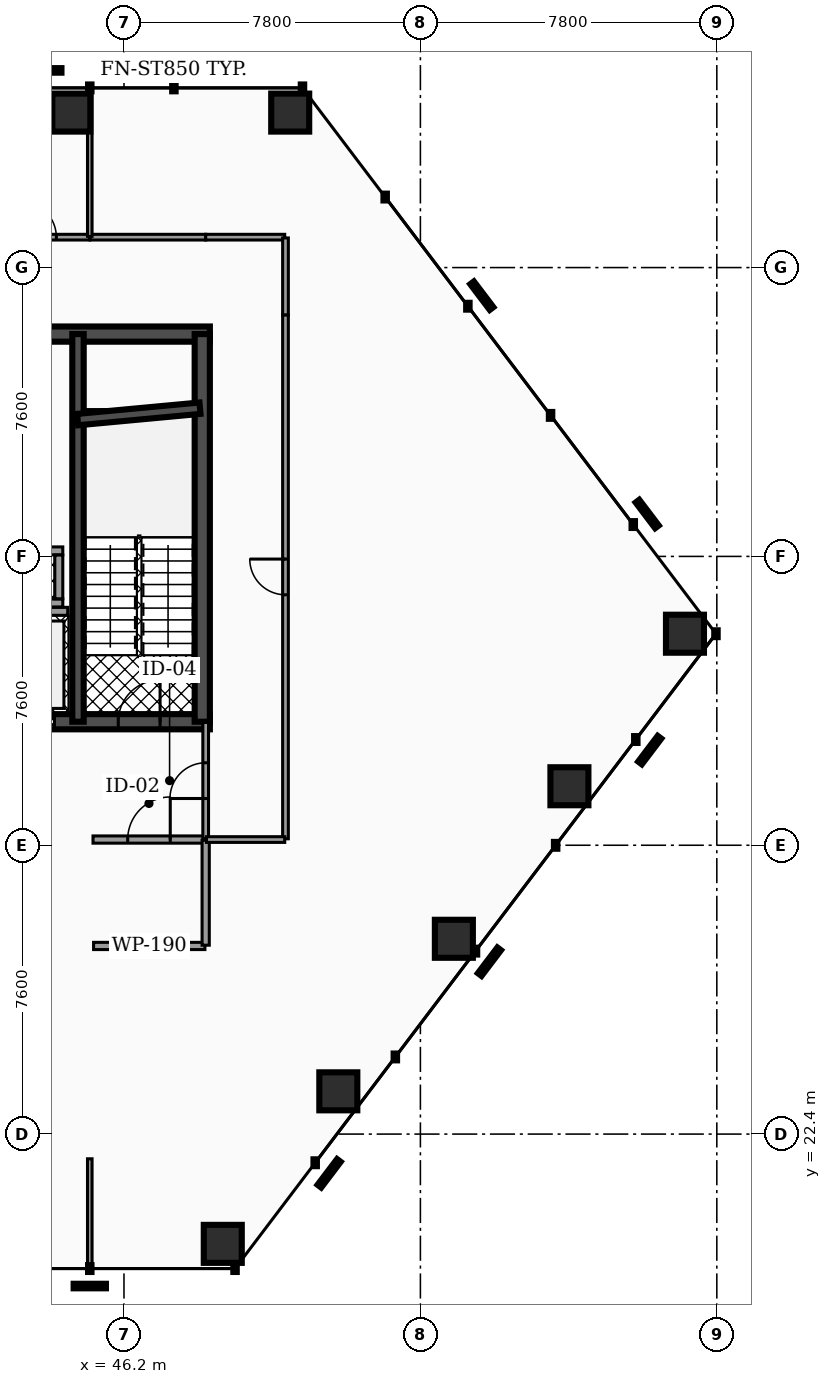
"""IFC4 building model, lengths in metres.
Left out: names, types, materials, properties, quantities, classifications, styles, units other than length and angle.
Written with IfcOpenShell. Run it as: python <this file> out.ifc"""

import sys

from ifc_helpers import new_model, si_unit, direction, frame, frame_2d, origin, origin_2d, place, context, subcontext, project, spatial, rectangle, hollow_rectangle, extrude, element, fill, save


model = new_model("IFC4")
c1 = context("Model", 3, precision=1e-05, world=origin(), true_north=direction((0.0, 1.0)))
c2 = subcontext(c1, "Body", "Model", "MODEL_VIEW")
j1 = project(units=[si_unit("LENGTHUNIT", "METRE"), si_unit("PLANEANGLEUNIT", "RADIAN")], contexts=[c1])
p1 = place(None, origin())
s1 = spatial("IfcSite", under=j1, at=p1, CompositionType="ELEMENT")
p2 = place(p1, origin())
s2 = spatial("IfcBuilding", under=s1, at=p2, CompositionType="ELEMENT")
p3 = place(p2, frame((0.0, 0.0, 56.1)))
s3 = spatial("IfcBuildingStorey", under=s2, at=p3, CompositionType="ELEMENT", Elevation=56.1)
p4 = place(p3, frame((28.4, 43.45, 0.0), z_axis=(0.0, 0.0, 1.0), x_axis=(1.0, 0.0, 0.0)))
e1 = element("IfcWall", 1, at=p4, inside=s3, PredefinedType="SHEAR", context=c2, shape_type="SweptSolid", body=[
    extrude(rectangle(XDim=20.06, YDim=0.4, at=frame_2d((10.03, 0.0))), origin(), (0.0, 0.0, 1.0), 3.82),
])
p5 = place(p3, frame((28.4, 33.25, 0.0), z_axis=(0.0, 0.0, 1.0), x_axis=(1.0, 0.0, 0.0)))
e2 = element("IfcWall", 2, at=p5, inside=s3, PredefinedType="SHEAR", context=c2, shape_type="SweptSolid", body=[
    extrude(rectangle(XDim=20.06, YDim=0.4, at=frame_2d((10.03, 0.0))), origin(), (0.0, 0.0, 1.0), 3.82),
])
p6 = place(p5, frame((4.03, 0.0, 0.0)))
e3 = element("IfcOpeningElement", 3, at=p6, cuts=e2, PredefinedType="OPENING", context=c2, shape_type="SweptSolid", body=[
    extrude(rectangle(XDim=1.1, YDim=2.15, at=frame_2d((0.55, 1.075))), frame((0.0, 0.21, 0.0), z_axis=(0.0, -1.0, 0.0), x_axis=(1.0, 0.0, 0.0)), (0.0, 0.0, 1.0), 0.42),
])
p7 = place(p5, frame((14.87, 0.0, 0.0)))
e4 = element("IfcOpeningElement", 4, at=p7, cuts=e2, PredefinedType="OPENING", context=c2, shape_type="SweptSolid", body=[
    extrude(rectangle(XDim=1.1, YDim=2.15, at=frame_2d((0.55, 1.075))), frame((0.0, 0.21, 0.0), z_axis=(0.0, -1.0, 0.0), x_axis=(1.0, 0.0, 0.0)), (0.0, 0.0, 1.0), 0.42),
])
p8 = place(p5, frame((1.31, 0.0, 0.0)))
e5 = element("IfcOpeningElement", 5, at=p8, cuts=e2, PredefinedType="OPENING", context=c2, shape_type="SweptSolid", body=[
    extrude(rectangle(XDim=1.1, YDim=2.2, at=frame_2d((0.55, 1.1))), frame((0.0, 0.21, 0.0), z_axis=(0.0, -1.0, 0.0), x_axis=(1.0, 0.0, 0.0)), (0.0, 0.0, 1.0), 0.42),
])
p9 = place(p5, frame((9.44, 0.0, 0.0)))
e6 = element("IfcOpeningElement", 6, at=p9, cuts=e2, PredefinedType="OPENING", context=c2, shape_type="SweptSolid", body=[
    extrude(rectangle(XDim=1.12, YDim=2.05, at=frame_2d((0.56, 1.025))), frame((0.0, 0.21, 0.0), z_axis=(0.0, -1.0, 0.0), x_axis=(1.0, 0.0, 0.0)), (0.0, 0.0, 1.0), 0.42),
])
p10 = place(p5, frame((17.65, 0.0, 0.0)))
e7 = element("IfcOpeningElement", 7, at=p10, cuts=e2, PredefinedType="OPENING", context=c2, shape_type="SweptSolid", body=[
    extrude(rectangle(XDim=1.1, YDim=2.2, at=frame_2d((0.55, 1.1))), frame((0.0, 0.21, 0.0), z_axis=(0.0, -1.0, 0.0), x_axis=(1.0, 0.0, 0.0)), (0.0, 0.0, 1.0), 0.42),
])
p11 = place(p3, frame((44.99, 33.25, 0.0), z_axis=(0.0, 0.0, 1.0), x_axis=(0.0, 1.0, 0.0)))
e8 = element("IfcWall", 8, at=p11, inside=s3, PredefinedType="SHEAR", context=c2, shape_type="SweptSolid", body=[
    extrude(rectangle(XDim=10.2, YDim=0.3, at=frame_2d((5.1, 0.0))), origin(), (0.0, 0.0, 1.0), 3.82),
])
p12 = place(p3, frame((48.26, 33.25, 0.0), z_axis=(0.0, 0.0, 1.0), x_axis=(0.0, 1.0, 0.0)))
e9 = element("IfcWall", 9, at=p12, inside=s3, PredefinedType="SHEAR", context=c2, shape_type="SweptSolid", body=[
    extrude(rectangle(XDim=10.2, YDim=0.4, at=frame_2d((5.1, 0.0))), origin(), (0.0, 0.0, 1.0), 3.82),
])
p13 = place(p3, frame((44.98, 41.2, 0.0), z_axis=(0.0, 0.0, 1.0), x_axis=(0.995686468965, 0.09278176286, 0.0)))
e10 = element("IfcWall", 10, at=p13, inside=s3, PredefinedType="SHEAR", context=c2, shape_type="SweptSolid", body=[
    extrude(rectangle(XDim=3.234, YDim=0.3, at=frame_2d((1.617, 0.0))), origin(), (0.0, 0.0, 1.0), 3.82),
])
for number, where, z_axis, x_axis in (
    (11, (50.574, 49.278, 0.0), (0.0, 0.0, 1.0), (1.0, 0.0, 0.0)),
    (12, (44.814, 49.278, 0.0), (0.0, 0.0, 1.0), (1.0, 0.0, 0.0)),
    (13, (48.8, 19.512, 0.0), (0.0, 0.0, 1.0), (1.0, 0.0, 0.0)),
    (14, (51.84, 23.525, 0.0), (0.0, 0.0, 1.0), (1.0, 0.0, 0.0)),
    (15, (54.881, 27.539, 0.0), (0.0, 0.0, 1.0), (1.0, 0.0, 0.0)),
    (16, (57.921, 31.552, 0.0), (0.0, 0.0, 1.0), (1.0, 0.0, 0.0)),
    (17, (60.962, 35.566, 0.0), (0.0, 0.0, 1.0), (1.0, 0.0, 0.0)),
):
    element("IfcColumn", number, at=place(p3, frame(where, z_axis=z_axis, x_axis=x_axis)), inside=s3, PredefinedType="COLUMN", context=c2, shape_type="SweptSolid", body=[
        extrude(hollow_rectangle(XDim=1.0, YDim=1.0, WallThickness=0.05, at=origin_2d()), origin(), (0.0, 0.0, 1.0), 3.82),
    ])
p14 = place(p3, frame((42.92, 36.155, 0.0), z_axis=(0.0, 0.0, 1.0), x_axis=(1.0, 0.0, 0.0)))
e18 = element("IfcWall", 18, at=p14, inside=s3, PredefinedType="SOLIDWALL", context=c2, shape_type="SweptSolid", body=[
    extrude(rectangle(XDim=1.8, YDim=0.21, at=frame_2d((0.9, 0.0))), origin(), (0.0, 0.0, 1.0), 2.792),
])
for number, where, z_axis, x_axis in (
    (19, (42.99, 36.375, 0.0), (0.0, 0.0, 1.0), (1.0, 0.0, 0.0)),
    (20, (42.99, 37.745, 0.0), (0.0, 0.0, 1.0), (1.0, 0.0, 0.0)),
):
    element("IfcWall", number, at=place(p3, frame(where, z_axis=z_axis, x_axis=x_axis)), inside=s3, PredefinedType="SOLIDWALL", context=c2, shape_type="SweptSolid", body=[
        extrude(rectangle(XDim=1.6, YDim=0.21, at=frame_2d((0.8, 0.0))), origin(), (0.0, 0.0, 1.0), 3.82),
    ])
p15 = place(p3, frame((44.485, 36.485, 0.0), z_axis=(0.0, 0.0, 1.0), x_axis=(0.0, 1.0, 0.0)))
e21 = element("IfcWall", 21, at=p15, inside=s3, PredefinedType="SOLIDWALL", context=c2, shape_type="SweptSolid", body=[
    extrude(rectangle(XDim=1.15, YDim=0.21, at=frame_2d((0.575, 0.0))), origin(), (0.0, 0.0, 1.0), 3.82),
])
p16 = place(p3, frame((45.385, 30.15, 0.0), z_axis=(0.0, 0.0, 1.0), x_axis=(1.0, 0.0, 0.0)))
e22 = element("IfcWall", 22, at=p16, inside=s3, PredefinedType="PARTITIONING", context=c2, shape_type="SweptSolid", body=[
    extrude(rectangle(XDim=2.945, YDim=0.19, at=frame_2d((1.473, 0.0))), origin(), (0.0, 0.0, 1.0), 2.777),
])
p17 = place(p16, frame((0.913, 0.0, 0.0)))
e23 = element("IfcOpeningElement", 23, at=p17, cuts=e22, PredefinedType="OPENING", context=c2, shape_type="SweptSolid", body=[
    extrude(rectangle(XDim=1.12, YDim=2.05, at=frame_2d((0.56, 1.025))), frame((0.0, 0.105, 0.0), z_axis=(0.0, -1.0, 0.0), x_axis=(1.0, 0.0, 0.0)), (0.0, 0.0, 1.0), 0.21),
])
p18 = place(p3, frame((48.35, 30.17, 0.0), z_axis=(0.0, 0.0, 1.0), x_axis=(0.0, 1.0, 0.0)))
e24 = element("IfcWall", 24, at=p18, inside=s3, PredefinedType="PARTITIONING", context=c2, shape_type="SweptSolid", body=[
    extrude(rectangle(XDim=3.06, YDim=0.15, at=frame_2d((1.53, 0.0))), origin(), (0.0, 0.0, 1.0), 2.777),
])
p19 = place(p18, frame((1.06, 0.0, 0.0)))
e25 = element("IfcOpeningElement", 25, at=p19, cuts=e24, PredefinedType="OPENING", context=c2, shape_type="SweptSolid", body=[
    extrude(rectangle(XDim=0.94, YDim=2.05, at=frame_2d((0.47, 1.025))), frame((0.0, 0.085, 0.0), z_axis=(0.0, -1.0, 0.0), x_axis=(1.0, 0.0, 0.0)), (0.0, 0.0, 1.0), 0.17),
])
p20 = place(p3, frame((45.4, 27.35, 0.0), z_axis=(0.0, 0.0, 1.0), x_axis=(1.0, 0.0, 0.0)))
e26 = element("IfcWall", 26, at=p20, inside=s3, PredefinedType="PARTITIONING", context=c2, shape_type="SweptSolid", body=[
    extrude(rectangle(XDim=2.93, YDim=0.19, at=frame_2d((1.465, 0.0))), origin(), (0.0, 0.0, 1.0), 2.777),
])
p21 = place(p3, frame((48.35, 27.37, 0.0), z_axis=(0.0, 0.0, 1.0), x_axis=(0.0, 1.0, 0.0)))
e27 = element("IfcWall", 27, at=p21, inside=s3, PredefinedType="PARTITIONING", context=c2, shape_type="SweptSolid", body=[
    extrude(rectangle(XDim=2.76, YDim=0.19, at=frame_2d((1.38, 0.0))), origin(), (0.0, 0.0, 1.0), 2.777),
])
p22 = place(p3, frame((45.305, 46.0, 0.0), z_axis=(0.0, 0.0, 1.0), x_axis=(1.0, 0.0, 0.0)))
e28 = element("IfcWall", 28, at=p22, inside=s3, PredefinedType="PARTITIONING", context=c2, shape_type="SweptSolid", body=[
    extrude(rectangle(XDim=3.045, YDim=0.15, at=frame_2d((1.522, 0.0))), origin(), (0.0, 0.0, 1.0), 2.777),
])
p23 = place(p3, frame((48.35, 46.0, 0.0), z_axis=(0.0, 0.0, 1.0), x_axis=(1.0, 0.0, 0.0)))
e29 = element("IfcWall", 29, at=p23, inside=s3, PredefinedType="PARTITIONING", context=c2, shape_type="SweptSolid", body=[
    extrude(rectangle(XDim=2.08, YDim=0.15, at=frame_2d((1.04, 0.0))), origin(), (0.0, 0.0, 1.0), 2.777),
])
p24 = place(p3, frame((50.45, 43.95, 0.0), z_axis=(0.0, 0.0, 1.0), x_axis=(0.0, 1.0, 0.0)))
e30 = element("IfcWall", 30, at=p24, inside=s3, PredefinedType="PARTITIONING", context=c2, shape_type="SweptSolid", body=[
    extrude(rectangle(XDim=2.03, YDim=0.15, at=frame_2d((1.015, 0.0))), origin(), (0.0, 0.0, 1.0), 2.777),
])
p25 = place(p3, frame((50.45, 30.17, 0.0), z_axis=(0.0, 0.0, 1.0), x_axis=(0.0, 1.0, 0.0)))
e31 = element("IfcWall", 31, at=p25, inside=s3, PredefinedType="PARTITIONING", context=c2, shape_type="SweptSolid", body=[
    extrude(rectangle(XDim=13.78, YDim=0.15, at=frame_2d((6.89, 0.0))), origin(), (0.0, 0.0, 1.0), 2.777),
])
p26 = place(p25, frame((6.42, 0.0, 0.0)))
e32 = element("IfcOpeningElement", 32, at=p26, cuts=e31, PredefinedType="OPENING", context=c2, shape_type="SweptSolid", body=[
    extrude(rectangle(XDim=0.94, YDim=2.05, at=frame_2d((0.47, 1.025))), frame((0.0, 0.085, 0.0), z_axis=(0.0, -1.0, 0.0), x_axis=(1.0, 0.0, 0.0)), (0.0, 0.0, 1.0), 0.17),
])
p27 = place(p3, frame((48.37, 30.15, 0.0), z_axis=(0.0, 0.0, 1.0), x_axis=(1.0, 0.0, 0.0)))
e33 = element("IfcWall", 33, at=p27, inside=s3, PredefinedType="PARTITIONING", context=c2, shape_type="SweptSolid", body=[
    extrude(rectangle(XDim=2.06, YDim=0.15, at=frame_2d((1.03, 0.0))), origin(), (0.0, 0.0, 1.0), 2.777),
])
p28 = place(p3, frame((42.605, 46.0, 0.0), z_axis=(0.0, 0.0, 1.0), x_axis=(1.0, 0.0, 0.0)))
e34 = element("IfcWall", 34, at=p28, inside=s3, PredefinedType="PARTITIONING", context=c2, shape_type="SweptSolid", body=[
    extrude(rectangle(XDim=2.69, YDim=0.15, at=frame_2d((1.345, 0.0))), origin(), (0.0, 0.0, 1.0), 2.777),
])
p29 = place(p28, frame((0.875, 0.0, 0.0)))
e35 = element("IfcOpeningElement", 35, at=p29, cuts=e34, PredefinedType="OPENING", context=c2, shape_type="SweptSolid", body=[
    extrude(rectangle(XDim=0.94, YDim=2.05, at=frame_2d((0.47, 1.025))), frame((0.0, 0.085, 0.0), z_axis=(0.0, -1.0, 0.0), x_axis=(1.0, 0.0, 0.0)), (0.0, 0.0, 1.0), 0.17),
])
p30 = place(p3, frame((45.3, 18.877, 0.0), z_axis=(0.0, 0.0, 1.0), x_axis=(0.0, 1.0, 0.0)))
e36 = element("IfcWall", 36, at=p30, inside=s3, PredefinedType="PARTITIONING", context=c2, shape_type="SweptSolid", body=[
    extrude(rectangle(XDim=2.873, YDim=0.12, at=frame_2d((1.437, 0.0))), origin(), (0.0, 0.0, 1.0), 2.777),
])
p31 = place(p3, frame((45.3, 46.02, 0.0), z_axis=(0.0, 0.0, 1.0), x_axis=(0.0, 1.0, 0.0)))
e37 = element("IfcWall", 37, at=p31, inside=s3, PredefinedType="PARTITIONING", context=c2, shape_type="SweptSolid", body=[
    extrude(rectangle(XDim=3.893, YDim=0.12, at=frame_2d((1.946, 0.0))), origin(), (0.0, 0.0, 1.0), 2.777),
])
p32 = place(p7, origin())
e38 = element("IfcDoor", 38, at=p32, inside=s3, OperationType="SLIDING_TO_RIGHT", PredefinedType="DOOR", context=c2, shape_type="SweptSolid", body=[
    extrude(rectangle(XDim=1.1, YDim=2.15, at=frame_2d((0.55, 1.075))), frame((0.0, 0.025, 0.0), z_axis=(0.0, -1.0, 0.0), x_axis=(1.0, 0.0, 0.0)), (0.0, 0.0, 1.0), 0.05),
])
fill(e4, e38)
p33 = place(p10, origin())
e39 = element("IfcDoor", 39, at=p33, inside=s3, OperationType="SINGLE_SWING_RIGHT", PredefinedType="DOOR", context=c2, shape_type="SweptSolid", body=[
    extrude(rectangle(XDim=1.1, YDim=2.2, at=frame_2d((0.55, 1.1))), frame((0.0, 0.025, 0.0), z_axis=(0.0, -1.0, 0.0), x_axis=(1.0, 0.0, 0.0)), (0.0, 0.0, 1.0), 0.05),
])
fill(e7, e39)
p34 = place(p17, origin())
e40 = element("IfcDoor", 40, at=p34, inside=s3, OperationType="SINGLE_SWING_RIGHT", PredefinedType="DOOR", context=c2, shape_type="SweptSolid", body=[
    extrude(rectangle(XDim=1.12, YDim=2.05, at=frame_2d((0.56, 1.025))), frame((0.0, 0.025, 0.0), z_axis=(0.0, -1.0, 0.0), x_axis=(1.0, 0.0, 0.0)), (0.0, 0.0, 1.0), 0.05),
])
fill(e23, e40)
p35 = place(p19, origin())
e41 = element("IfcDoor", 41, at=p35, inside=s3, OperationType="SINGLE_SWING_LEFT", PredefinedType="DOOR", context=c2, shape_type="SweptSolid", body=[
    extrude(rectangle(XDim=0.94, YDim=2.05, at=frame_2d((0.47, 1.025))), frame((0.0, 0.025, 0.0), z_axis=(0.0, -1.0, 0.0), x_axis=(1.0, 0.0, 0.0)), (0.0, 0.0, 1.0), 0.05),
])
fill(e25, e41)
p36 = place(p26, origin())
e42 = element("IfcDoor", 42, at=p36, inside=s3, OperationType="SINGLE_SWING_RIGHT", PredefinedType="DOOR", context=c2, shape_type="SweptSolid", body=[
    extrude(rectangle(XDim=0.94, YDim=2.05, at=frame_2d((0.47, 1.025))), frame((0.0, 0.025, 0.0), z_axis=(0.0, -1.0, 0.0), x_axis=(1.0, 0.0, 0.0)), (0.0, 0.0, 1.0), 0.05),
])
fill(e32, e42)
p37 = place(p29, origin())
e43 = element("IfcDoor", 43, at=p37, inside=s3, OperationType="SINGLE_SWING_LEFT", PredefinedType="DOOR", context=c2, shape_type="SweptSolid", body=[
    extrude(rectangle(XDim=0.94, YDim=2.05, at=frame_2d((0.47, 1.025))), frame((0.0, 0.025, 0.0), z_axis=(0.0, -1.0, 0.0), x_axis=(1.0, 0.0, 0.0)), (0.0, 0.0, 1.0), 0.05),
])
fill(e35, e43)
save(model, sys.argv[1])
